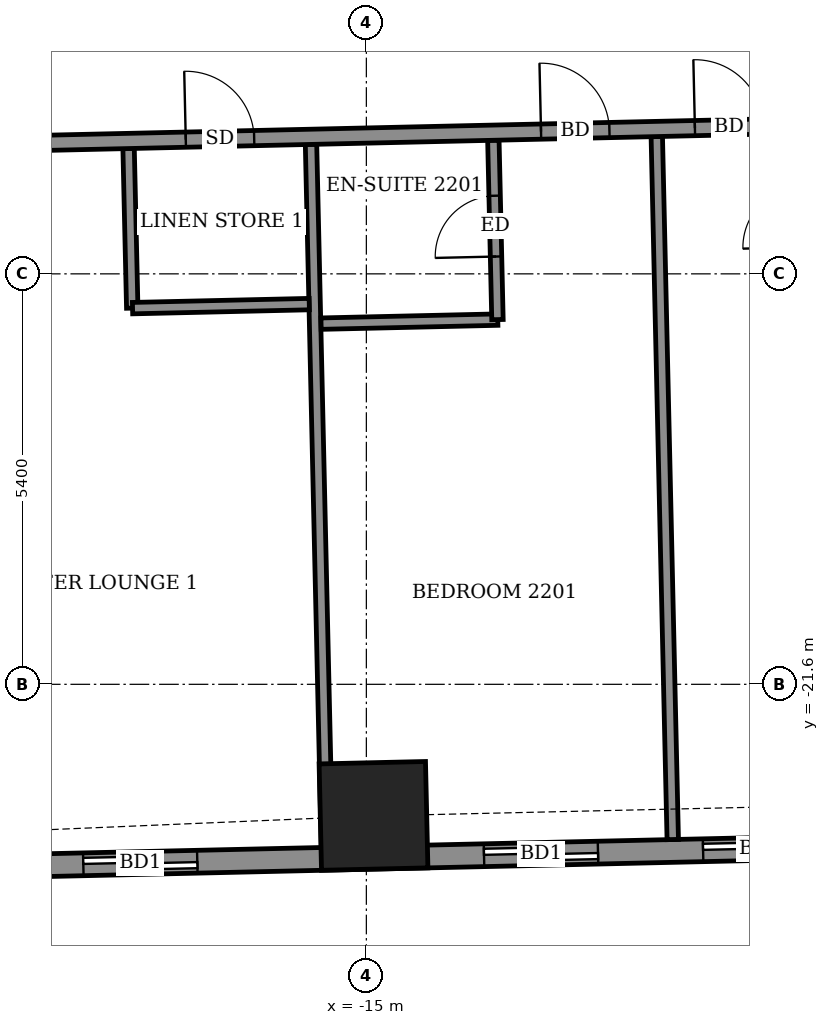
"""IFC4 building model, lengths in metres.
Left out: names, types, materials, properties, quantities, classifications, styles, units other than length and angle.
Written with IfcOpenShell. Run it as: python <this file> out.ifc"""

import sys

from ifc_helpers import new_model, si_unit, direction, frame, frame_2d, origin, origin_2d, place, context, subcontext, project, spatial, rectangle, extrude, element, fill, save


model = new_model("IFC4")
c1 = context("Model", 3, precision=1e-05, world=origin(), true_north=direction((0.0, 1.0)))
c2 = subcontext(c1, "Body", "Model", "MODEL_VIEW")
j1 = project(units=[si_unit("LENGTHUNIT", "METRE"), si_unit("PLANEANGLEUNIT", "RADIAN")], contexts=[c1])
p1 = place(None, origin())
s1 = spatial("IfcSite", under=j1, at=p1, CompositionType="ELEMENT")
p2 = place(p1, origin())
s2 = spatial("IfcBuilding", under=s1, at=p2, CompositionType="ELEMENT")
p3 = place(p2, frame((0.0, 0.0, 90.1)))
s3 = spatial("IfcBuildingStorey", under=s2, at=p3, CompositionType="ELEMENT", Elevation=90.1)
p4 = place(p3, frame((-14.906, -23.331, -0.55), z_axis=(0.0, 0.0, 1.0), x_axis=(0.999741835415, 0.022721411066, 0.0)))
e1 = element("IfcColumn", 1, at=p4, inside=s3, PredefinedType="COLUMN", context=c2, shape_type="SweptSolid", body=[
    extrude(rectangle(XDim=1.4, YDim=1.4, at=origin_2d()), origin(), (0.0, 0.0, 1.0), 3.6),
])
p5 = place(p3, frame((-21.409, -24.029, 0.0), z_axis=(0.0, 0.0, 1.0), x_axis=(0.999742634032, 0.022686244721, 0.0)))
e2 = element("IfcWall", 2, at=p5, inside=s3, PredefinedType="SOLIDWALL", context=c2, shape_type="SweptSolid", body=[
    extrude(rectangle(XDim=46.372, YDim=0.3, at=frame_2d((23.186, 0.0))), origin(), (0.0, 0.0, 1.0), 3.05),
])
p6 = place(p5, frame((2.686, 0.0, 0.0)))
e3 = element("IfcOpeningElement", 3, at=p6, cuts=e2, PredefinedType="OPENING", context=c2, shape_type="SweptSolid", body=[
    extrude(rectangle(XDim=1.5, YDim=2.4, at=frame_2d((0.75, 1.2))), frame((0.0, 0.16, 0.0), z_axis=(0.0, -1.0, 0.0), x_axis=(1.0, 0.0, 0.0)), (0.0, 0.0, 1.0), 0.32),
])
p7 = place(p5, frame((7.959, 0.0, 0.0)))
e4 = element("IfcOpeningElement", 4, at=p7, cuts=e2, PredefinedType="OPENING", context=c2, shape_type="SweptSolid", body=[
    extrude(rectangle(XDim=1.5, YDim=2.4, at=frame_2d((0.75, 1.2))), frame((0.0, 0.16, 0.0), z_axis=(0.0, -1.0, 0.0), x_axis=(1.0, 0.0, 0.0)), (0.0, 0.0, 1.0), 0.32),
])
p8 = place(p5, frame((10.842, 0.0, 0.0)))
e5 = element("IfcOpeningElement", 5, at=p8, cuts=e2, PredefinedType="OPENING", context=c2, shape_type="SweptSolid", body=[
    extrude(rectangle(XDim=1.5, YDim=2.4, at=frame_2d((0.75, 1.2))), frame((0.0, 0.16, 0.0), z_axis=(0.0, -1.0, 0.0), x_axis=(1.0, 0.0, 0.0)), (0.0, 0.0, 1.0), 0.32),
])
p9 = place(p5, frame((16.3, 0.0, 0.0)))
e6 = element("IfcOpeningElement", 6, at=p9, cuts=e2, PredefinedType="OPENING", context=c2, shape_type="SweptSolid", body=[
    extrude(rectangle(XDim=1.5, YDim=2.4, at=frame_2d((0.75, 1.2))), frame((0.0, 0.16, 0.0), z_axis=(0.0, -1.0, 0.0), x_axis=(1.0, 0.0, 0.0)), (0.0, 0.0, 1.0), 0.32),
])
p10 = place(p5, frame((21.326, 0.0, 0.0)))
e7 = element("IfcOpeningElement", 7, at=p10, cuts=e2, PredefinedType="OPENING", context=c2, shape_type="SweptSolid", body=[
    extrude(rectangle(XDim=1.5, YDim=2.4, at=frame_2d((0.75, 1.2))), frame((0.0, 0.16, 0.0), z_axis=(0.0, -1.0, 0.0), x_axis=(1.0, 0.0, 0.0)), (0.0, 0.0, 1.0), 0.32),
])
p11 = place(p5, frame((24.21, 0.0, 0.0)))
e8 = element("IfcOpeningElement", 8, at=p11, cuts=e2, PredefinedType="OPENING", context=c2, shape_type="SweptSolid", body=[
    extrude(rectangle(XDim=1.5, YDim=2.4, at=frame_2d((0.75, 1.2))), frame((0.0, 0.16, 0.0), z_axis=(0.0, -1.0, 0.0), x_axis=(1.0, 0.0, 0.0)), (0.0, 0.0, 1.0), 0.32),
])
p12 = place(p5, frame((29.769, 0.0, 0.0)))
e9 = element("IfcOpeningElement", 9, at=p12, cuts=e2, PredefinedType="OPENING", context=c2, shape_type="SweptSolid", body=[
    extrude(rectangle(XDim=1.5, YDim=2.4, at=frame_2d((0.75, 1.2))), frame((0.0, 0.16, 0.0), z_axis=(0.0, -1.0, 0.0), x_axis=(1.0, 0.0, 0.0)), (0.0, 0.0, 1.0), 0.32),
])
p13 = place(p5, frame((34.819, 0.0, 0.0)))
e10 = element("IfcOpeningElement", 10, at=p13, cuts=e2, PredefinedType="OPENING", context=c2, shape_type="SweptSolid", body=[
    extrude(rectangle(XDim=1.5, YDim=2.4, at=frame_2d((0.75, 1.2))), frame((0.0, 0.16, 0.0), z_axis=(0.0, -1.0, 0.0), x_axis=(1.0, 0.0, 0.0)), (0.0, 0.0, 1.0), 0.32),
])
p14 = place(p5, frame((37.852, 0.0, 0.0)))
e11 = element("IfcOpeningElement", 11, at=p14, cuts=e2, PredefinedType="OPENING", context=c2, shape_type="SweptSolid", body=[
    extrude(rectangle(XDim=1.2, YDim=2.4, at=frame_2d((0.6, 1.2))), frame((0.0, 0.16, 0.0), z_axis=(0.0, -1.0, 0.0), x_axis=(1.0, 0.0, 0.0)), (0.0, 0.0, 1.0), 0.32),
])
p15 = place(p5, frame((42.373, 0.0, 0.9)))
e12 = element("IfcOpeningElement", 12, at=p15, cuts=e2, PredefinedType="OPENING", context=c2, shape_type="SweptSolid", body=[
    extrude(rectangle(XDim=2.4, YDim=1.5, at=frame_2d((1.2, 0.75))), frame((0.0, 0.16, 0.0), z_axis=(0.0, -1.0, 0.0), x_axis=(1.0, 0.0, 0.0)), (0.0, 0.0, 1.0), 0.32),
])
p16 = place(p3, frame((-15.518, -23.745, 0.0), z_axis=(0.0, 0.0, 1.0), x_axis=(-0.022697424684, 0.999742380272, 0.0)))
e13 = element("IfcWall", 13, at=p16, inside=s3, PredefinedType="PARTITIONING", context=c2, shape_type="SweptSolid", body=[
    extrude(rectangle(XDim=9.25, YDim=0.15, at=frame_2d((4.625, 0.0))), origin(), (0.0, 0.0, 1.0), 3.05),
])
p17 = place(p3, frame((-10.969, -23.642, 0.0), z_axis=(0.0, 0.0, 1.0), x_axis=(-0.022697424684, 0.999742380272, 0.0)))
e14 = element("IfcWall", 14, at=p17, inside=s3, PredefinedType="PARTITIONING", context=c2, shape_type="SweptSolid", body=[
    extrude(rectangle(XDim=9.25, YDim=0.15, at=frame_2d((4.625, 0.0))), origin(), (0.0, 0.0, 1.0), 2.55),
])
p18 = place(p3, frame((-15.596, -16.855, 0.0), z_axis=(0.0, 0.0, 1.0), x_axis=(0.999740478815, 0.022781023197, 0.0)))
e15 = element("IfcWall", 15, at=p18, inside=s3, PredefinedType="PARTITIONING", context=c2, shape_type="SweptSolid", body=[
    extrude(rectangle(XDim=2.325, YDim=0.15, at=frame_2d((1.163, 0.0))), origin(), (0.0, 0.0, 1.0), 3.05),
])
p19 = place(p3, frame((-13.275, -16.802, 0.0), z_axis=(0.0, 0.0, 1.0), x_axis=(-0.02297054684, 0.999736142178, 0.0)))
e16 = element("IfcWall", 16, at=p19, inside=s3, PredefinedType="PARTITIONING", context=c2, shape_type="SweptSolid", body=[
    extrude(rectangle(XDim=2.36, YDim=0.15, at=frame_2d((1.18, 0.0))), origin(), (0.0, 0.0, 1.0), 3.05),
])
p20 = place(p19, frame((0.83, 0.0, 0.0)))
e17 = element("IfcOpeningElement", 17, at=p20, cuts=e16, PredefinedType="OPENING", context=c2, shape_type="SweptSolid", body=[
    extrude(rectangle(XDim=0.8, YDim=2.1, at=frame_2d((0.4, 1.05))), frame((0.0, 0.085, 0.0), z_axis=(0.0, -1.0, 0.0), x_axis=(1.0, 0.0, 0.0)), (0.0, 0.0, 1.0), 0.17),
])
p21 = place(p3, frame((-18.08, -16.651, 0.0), z_axis=(0.0, 0.0, 1.0), x_axis=(-0.022792727877, 0.999740212033, 0.0)))
e18 = element("IfcWall", 18, at=p21, inside=s3, PredefinedType="PARTITIONING", context=c2, shape_type="SweptSolid", body=[
    extrude(rectangle(XDim=2.099, YDim=0.15, at=frame_2d((1.05, 0.0))), origin(), (0.0, 0.0, 1.0), 3.05),
])
p22 = place(p3, frame((-18.076, -16.651, 0.0), z_axis=(0.0, 0.0, 1.0), x_axis=(0.999740478815, 0.022781023197, 0.0)))
e19 = element("IfcWall", 19, at=p22, inside=s3, PredefinedType="PARTITIONING", context=c2, shape_type="SweptSolid", body=[
    extrude(rectangle(XDim=2.325, YDim=0.15, at=frame_2d((1.163, 0.0))), origin(), (0.0, 0.0, 1.0), 3.05),
])
p23 = place(p3, frame((-24.274, -14.591, 0.0), z_axis=(0.0, 0.0, 1.0), x_axis=(0.999742718753, 0.022682510909, 0.0)))
e20 = element("IfcWall", 20, at=p23, inside=s3, PredefinedType="PARTITIONING", context=c2, shape_type="SweptSolid", body=[
    extrude(rectangle(XDim=52.471, YDim=0.2, at=frame_2d((26.236, 0.0))), origin(), (0.0, 0.0, 1.0), 3.05),
])
p24 = place(p23, frame((1.525, 0.0, 0.0)))
e21 = element("IfcOpeningElement", 21, at=p24, cuts=e20, PredefinedType="OPENING", context=c2, shape_type="SweptSolid", body=[
    extrude(rectangle(XDim=1.0, YDim=2.1, at=frame_2d((0.5, 1.05))), frame((0.0, 0.11, 0.0), z_axis=(0.0, -1.0, 0.0), x_axis=(1.0, 0.0, 0.0)), (0.0, 0.0, 1.0), 0.22),
])
p25 = place(p23, frame((6.9, 0.0, 0.0)))
e22 = element("IfcOpeningElement", 22, at=p25, cuts=e20, PredefinedType="OPENING", context=c2, shape_type="SweptSolid", body=[
    extrude(rectangle(XDim=0.9, YDim=2.1, at=frame_2d((0.45, 1.05))), frame((0.0, 0.11, 0.0), z_axis=(0.0, -1.0, 0.0), x_axis=(1.0, 0.0, 0.0)), (0.0, 0.0, 1.0), 0.22),
])
p26 = place(p23, frame((11.575, 0.0, 0.0)))
e23 = element("IfcOpeningElement", 23, at=p26, cuts=e20, PredefinedType="OPENING", context=c2, shape_type="SweptSolid", body=[
    extrude(rectangle(XDim=0.9, YDim=2.1, at=frame_2d((0.45, 1.05))), frame((0.0, 0.11, 0.0), z_axis=(0.0, -1.0, 0.0), x_axis=(1.0, 0.0, 0.0)), (0.0, 0.0, 1.0), 0.22),
])
p27 = place(p23, frame((13.6, 0.0, 0.0)))
e24 = element("IfcOpeningElement", 24, at=p27, cuts=e20, PredefinedType="OPENING", context=c2, shape_type="SweptSolid", body=[
    extrude(rectangle(XDim=0.9, YDim=2.1, at=frame_2d((0.45, 1.05))), frame((0.0, 0.11, 0.0), z_axis=(0.0, -1.0, 0.0), x_axis=(1.0, 0.0, 0.0)), (0.0, 0.0, 1.0), 0.22),
])
p28 = place(p23, frame((20.45, 0.0, 0.0)))
e25 = element("IfcOpeningElement", 25, at=p28, cuts=e20, PredefinedType="OPENING", context=c2, shape_type="SweptSolid", body=[
    extrude(rectangle(XDim=0.9, YDim=2.1, at=frame_2d((0.45, 1.05))), frame((0.0, 0.11, 0.0), z_axis=(0.0, -1.0, 0.0), x_axis=(1.0, 0.0, 0.0)), (0.0, 0.0, 1.0), 0.22),
])
p29 = place(p23, frame((22.6, 0.0, 0.0)))
e26 = element("IfcOpeningElement", 26, at=p29, cuts=e20, PredefinedType="OPENING", context=c2, shape_type="SweptSolid", body=[
    extrude(rectangle(XDim=0.9, YDim=2.1, at=frame_2d((0.45, 1.05))), frame((0.0, 0.11, 0.0), z_axis=(0.0, -1.0, 0.0), x_axis=(1.0, 0.0, 0.0)), (0.0, 0.0, 1.0), 0.22),
])
p30 = place(p23, frame((29.475, 0.0, 0.0)))
e27 = element("IfcOpeningElement", 27, at=p30, cuts=e20, PredefinedType="OPENING", context=c2, shape_type="SweptSolid", body=[
    extrude(rectangle(XDim=0.9, YDim=2.1, at=frame_2d((0.45, 1.05))), frame((0.0, 0.11, 0.0), z_axis=(0.0, -1.0, 0.0), x_axis=(1.0, 0.0, 0.0)), (0.0, 0.0, 1.0), 0.22),
])
p31 = place(p23, frame((31.675, 0.0, 0.0)))
e28 = element("IfcOpeningElement", 28, at=p31, cuts=e20, PredefinedType="OPENING", context=c2, shape_type="SweptSolid", body=[
    extrude(rectangle(XDim=0.9, YDim=2.1, at=frame_2d((0.45, 1.05))), frame((0.0, 0.11, 0.0), z_axis=(0.0, -1.0, 0.0), x_axis=(1.0, 0.0, 0.0)), (0.0, 0.0, 1.0), 0.22),
])
p32 = place(p23, frame((38.675, 0.0, 0.0)))
e29 = element("IfcOpeningElement", 29, at=p32, cuts=e20, PredefinedType="OPENING", context=c2, shape_type="SweptSolid", body=[
    extrude(rectangle(XDim=0.9, YDim=2.1, at=frame_2d((0.45, 1.05))), frame((0.0, 0.11, 0.0), z_axis=(0.0, -1.0, 0.0), x_axis=(1.0, 0.0, 0.0)), (0.0, 0.0, 1.0), 0.22),
])
p33 = place(p23, frame((40.675, 0.0, 0.0)))
e30 = element("IfcOpeningElement", 30, at=p33, cuts=e20, PredefinedType="OPENING", context=c2, shape_type="SweptSolid", body=[
    extrude(rectangle(XDim=0.9, YDim=2.1, at=frame_2d((0.45, 1.05))), frame((0.0, 0.11, 0.0), z_axis=(0.0, -1.0, 0.0), x_axis=(1.0, 0.0, 0.0)), (0.0, 0.0, 1.0), 0.22),
])
p34 = place(p23, frame((50.436, 0.0, 0.0)))
e31 = element("IfcOpeningElement", 31, at=p34, cuts=e20, PredefinedType="OPENING", context=c2, shape_type="SweptSolid", body=[
    extrude(rectangle(XDim=1.0, YDim=2.1, at=frame_2d((0.5, 1.05))), frame((0.0, 0.11, 0.0), z_axis=(0.0, -1.0, 0.0), x_axis=(1.0, 0.0, 0.0)), (0.0, 0.0, 1.0), 0.22),
])
p35 = place(p23, frame((45.45, 0.0, 0.0)))
e32 = element("IfcOpeningElement", 32, at=p35, cuts=e20, PredefinedType="OPENING", context=c2, shape_type="SweptSolid", body=[
    extrude(rectangle(XDim=0.9, YDim=2.1, at=frame_2d((0.45, 1.05))), frame((0.0, 0.11, 0.0), z_axis=(0.0, -1.0, 0.0), x_axis=(1.0, 0.0, 0.0)), (0.0, 0.0, 1.0), 0.22),
])
p36 = place(p6, origin())
e33 = element("IfcDoor", 33, at=p36, inside=s3, OperationType="SLIDING_TO_LEFT", PredefinedType="DOOR", context=c2, shape_type="SweptSolid", body=[
    extrude(rectangle(XDim=1.5, YDim=2.4, at=frame_2d((0.75, 1.2))), frame((0.0, 0.025, 0.0), z_axis=(0.0, -1.0, 0.0), x_axis=(1.0, 0.0, 0.0)), (0.0, 0.0, 1.0), 0.05),
])
fill(e3, e33)
p37 = place(p7, origin())
e34 = element("IfcDoor", 34, at=p37, inside=s3, OperationType="SLIDING_TO_LEFT", PredefinedType="DOOR", context=c2, shape_type="SweptSolid", body=[
    extrude(rectangle(XDim=1.5, YDim=2.4, at=frame_2d((0.75, 1.2))), frame((0.0, 0.025, 0.0), z_axis=(0.0, -1.0, 0.0), x_axis=(1.0, 0.0, 0.0)), (0.0, 0.0, 1.0), 0.05),
])
fill(e4, e34)
p38 = place(p8, origin())
e35 = element("IfcDoor", 35, at=p38, inside=s3, OperationType="SLIDING_TO_LEFT", PredefinedType="DOOR", context=c2, shape_type="SweptSolid", body=[
    extrude(rectangle(XDim=1.5, YDim=2.4, at=frame_2d((0.75, 1.2))), frame((0.0, 0.025, 0.0), z_axis=(0.0, -1.0, 0.0), x_axis=(1.0, 0.0, 0.0)), (0.0, 0.0, 1.0), 0.05),
])
fill(e5, e35)
p39 = place(p25, origin())
e36 = element("IfcDoor", 36, at=p39, inside=s3, OperationType="SINGLE_SWING_LEFT", PredefinedType="DOOR", context=c2, shape_type="SweptSolid", body=[
    extrude(rectangle(XDim=0.9, YDim=2.1, at=frame_2d((0.45, 1.05))), frame((0.0, 0.025, 0.0), z_axis=(0.0, -1.0, 0.0), x_axis=(1.0, 0.0, 0.0)), (0.0, 0.0, 1.0), 0.05),
])
fill(e22, e36)
p40 = place(p26, origin())
e37 = element("IfcDoor", 37, at=p40, inside=s3, OperationType="SINGLE_SWING_LEFT", PredefinedType="DOOR", context=c2, shape_type="SweptSolid", body=[
    extrude(rectangle(XDim=0.9, YDim=2.1, at=frame_2d((0.45, 1.05))), frame((0.0, 0.025, 0.0), z_axis=(0.0, -1.0, 0.0), x_axis=(1.0, 0.0, 0.0)), (0.0, 0.0, 1.0), 0.05),
])
fill(e23, e37)
p41 = place(p20, origin())
e38 = element("IfcDoor", 38, at=p41, inside=s3, OperationType="SINGLE_SWING_LEFT", PredefinedType="DOOR", context=c2, shape_type="SweptSolid", body=[
    extrude(rectangle(XDim=0.8, YDim=2.1, at=frame_2d((0.4, 1.05))), frame((0.0, 0.025, 0.0), z_axis=(0.0, -1.0, 0.0), x_axis=(1.0, 0.0, 0.0)), (0.0, 0.0, 1.0), 0.05),
])
fill(e17, e38)
p42 = place(p27, origin())
e39 = element("IfcDoor", 39, at=p42, inside=s3, OperationType="SINGLE_SWING_RIGHT", PredefinedType="DOOR", context=c2, shape_type="SweptSolid", body=[
    extrude(rectangle(XDim=0.9, YDim=2.1, at=frame_2d((0.45, 1.05))), frame((0.0, 0.025, 0.0), z_axis=(0.0, -1.0, 0.0), x_axis=(1.0, 0.0, 0.0)), (0.0, 0.0, 1.0), 0.05),
])
fill(e24, e39)
save(model, sys.argv[1])
